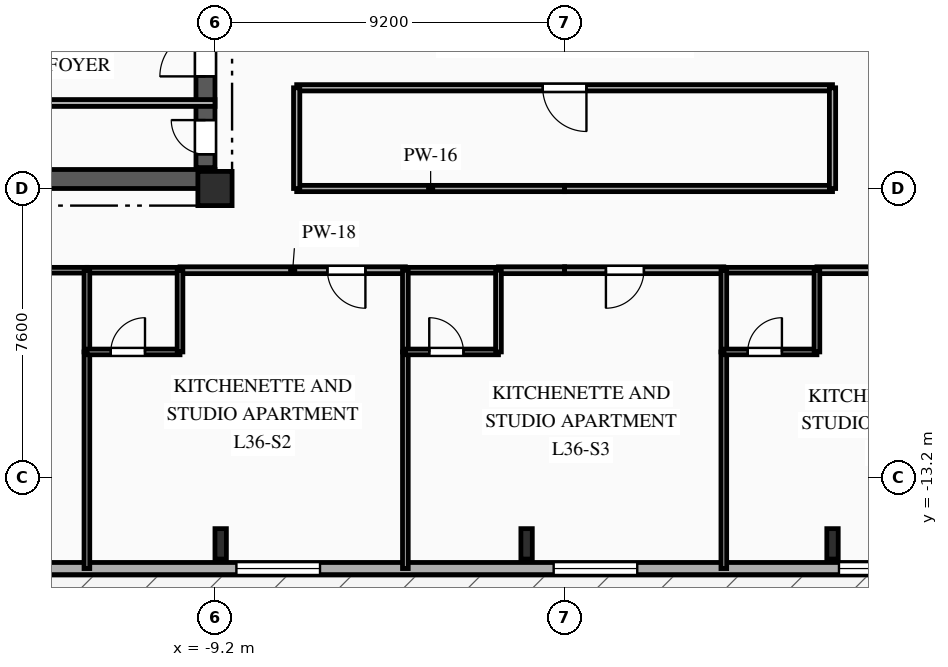
"""IFC4 building model, lengths in metres.
Left out: names, types, materials, properties, quantities, classifications, styles, units other than length and angle.
Written with IfcOpenShell. Run it as: python <this file> out.ifc"""

import sys

from ifc_helpers import new_model, si_unit, direction, frame, frame_2d, origin, origin_2d, place, context, subcontext, project, spatial, rectangle, i_section, extrude, element, fill, save


model = new_model("IFC4")
c1 = context("Model", 3, precision=1e-05, world=origin(), true_north=direction((0.0, 1.0)))
c2 = subcontext(c1, "Body", "Model", "MODEL_VIEW")
j1 = project(units=[si_unit("LENGTHUNIT", "METRE"), si_unit("PLANEANGLEUNIT", "RADIAN")], contexts=[c1])
p1 = place(None, origin())
s1 = spatial("IfcSite", under=j1, at=p1, CompositionType="ELEMENT")
p2 = place(p1, origin())
s2 = spatial("IfcBuilding", under=s1, at=p2, CompositionType="ELEMENT")
p3 = place(p2, frame((0.0, 0.0, 131.0)))
s3 = spatial("IfcBuildingStorey", under=s2, at=p3, CompositionType="ELEMENT", Elevation=131.0)
p4 = place(p3, frame((-9.2, -5.6, 0.0), z_axis=(0.0, 0.0, 1.0), x_axis=(1.0, 0.0, 0.0)))
e1 = element("IfcColumn", 1, at=p4, inside=s3, PredefinedType="COLUMN", context=c2, shape_type="SweptSolid", body=[
    extrude(rectangle(XDim=0.9, YDim=0.9, at=origin_2d()), origin(), (0.0, 0.0, 1.0), 3.35),
])
for number, where, z_axis, x_axis in (
    (2, (-9.05, -14.95, 0.0), (0.0, 0.0, 1.0), (1.0, 0.0, 0.0)),
    (3, (-1.0, -14.95, 0.0), (0.0, 0.0, 1.0), (1.0, 0.0, 0.0)),
    (4, (7.05, -14.95, 0.0), (0.0, 0.0, 1.0), (1.0, 0.0, 0.0)),
):
    element("IfcColumn", number, at=place(p3, frame(where, z_axis=z_axis, x_axis=x_axis)), inside=s3, PredefinedType="COLUMN", context=c2, shape_type="SweptSolid", body=[
        extrude(i_section(OverallWidth=0.3, OverallDepth=0.8, WebThickness=0.018, FlangeThickness=0.033, FilletRadius=0.03, at=origin_2d()), origin(), (0.0, 0.0, 1.0), 3.35),
    ])
p5 = place(p3, frame((23.8, -15.6, 0.0), z_axis=(0.0, 0.0, 1.0), x_axis=(-1.0, 0.0, 0.0)))
e5 = element("IfcWall", 5, at=p5, inside=s3, PredefinedType="SOLIDWALL", context=c2, shape_type="SweptSolid", body=[
    extrude(rectangle(XDim=49.6, YDim=0.32, at=frame_2d((24.8, 0.0))), origin(), (0.0, 0.0, 1.0), 3.04),
])
p6 = place(p5, frame((1.13, 0.0, 0.85)))
e6 = element("IfcOpeningElement", 6, at=p6, cuts=e5, PredefinedType="OPENING", context=c2, shape_type="SweptSolid", body=[
    extrude(rectangle(XDim=1.1, YDim=1.85, at=frame_2d((0.55, 0.925))), frame((0.0, 0.17, 0.0), z_axis=(0.0, -1.0, 0.0), x_axis=(1.0, 0.0, 0.0)), (0.0, 0.0, 1.0), 0.34),
])
p7 = place(p5, frame((6.255, 0.0, 0.85)))
e7 = element("IfcOpeningElement", 7, at=p7, cuts=e5, PredefinedType="OPENING", context=c2, shape_type="SweptSolid", body=[
    extrude(rectangle(XDim=1.65, YDim=1.85, at=frame_2d((0.825, 0.925))), frame((0.0, 0.17, 0.0), z_axis=(0.0, -1.0, 0.0), x_axis=(1.0, 0.0, 0.0)), (0.0, 0.0, 1.0), 0.34),
])
p8 = place(p5, frame((14.38, 0.0, 0.85)))
e8 = element("IfcOpeningElement", 8, at=p8, cuts=e5, PredefinedType="OPENING", context=c2, shape_type="SweptSolid", body=[
    extrude(rectangle(XDim=2.2, YDim=1.85, at=frame_2d((1.1, 0.925))), frame((0.0, 0.17, 0.0), z_axis=(0.0, -1.0, 0.0), x_axis=(1.0, 0.0, 0.0)), (0.0, 0.0, 1.0), 0.34),
])
p9 = place(p5, frame((21.888, 0.0, 0.85)))
e9 = element("IfcOpeningElement", 9, at=p9, cuts=e5, PredefinedType="OPENING", context=c2, shape_type="SweptSolid", body=[
    extrude(rectangle(XDim=2.2, YDim=1.85, at=frame_2d((1.1, 0.925))), frame((0.0, 0.17, 0.0), z_axis=(0.0, -1.0, 0.0), x_axis=(1.0, 0.0, 0.0)), (0.0, 0.0, 1.0), 0.34),
])
p10 = place(p5, frame((30.236, 0.0, 0.85)))
e10 = element("IfcOpeningElement", 10, at=p10, cuts=e5, PredefinedType="OPENING", context=c2, shape_type="SweptSolid", body=[
    extrude(rectangle(XDim=2.2, YDim=1.85, at=frame_2d((1.1, 0.925))), frame((0.0, 0.17, 0.0), z_axis=(0.0, -1.0, 0.0), x_axis=(1.0, 0.0, 0.0)), (0.0, 0.0, 1.0), 0.34),
])
p11 = place(p5, frame((38.897, 0.0, 0.85)))
e11 = element("IfcOpeningElement", 11, at=p11, cuts=e5, PredefinedType="OPENING", context=c2, shape_type="SweptSolid", body=[
    extrude(rectangle(XDim=1.65, YDim=1.85, at=frame_2d((0.825, 0.925))), frame((0.0, 0.17, 0.0), z_axis=(0.0, -1.0, 0.0), x_axis=(1.0, 0.0, 0.0)), (0.0, 0.0, 1.0), 0.34),
])
p12 = place(p5, frame((46.175, 0.0, 0.85)))
e12 = element("IfcOpeningElement", 12, at=p12, cuts=e5, PredefinedType="OPENING", context=c2, shape_type="SweptSolid", body=[
    extrude(rectangle(XDim=1.65, YDim=1.85, at=frame_2d((0.825, 0.925))), frame((0.0, 0.17, 0.0), z_axis=(0.0, -1.0, 0.0), x_axis=(1.0, 0.0, 0.0)), (0.0, 0.0, 1.0), 0.34),
])
p13 = place(p3, frame((-23.376, -19.829, 0.0), z_axis=(0.0, 0.0, 1.0), x_axis=(0.994522202864, 0.104525537599, 0.0)))
e13 = element("IfcWall", 13, at=p13, inside=s3, PredefinedType="PARAPET", context=c2, shape_type="SweptSolid", body=[
    extrude(rectangle(XDim=38.546, YDim=0.22, at=frame_2d((19.273, 0.0))), origin(), (0.0, 0.0, 1.0), 0.65),
])
p14 = place(p3, frame((-18.8, -5.35, 0.0), z_axis=(0.0, 0.0, 1.0), x_axis=(1.0, 0.0, 0.0)))
e14 = element("IfcWall", 14, at=p14, inside=s3, PredefinedType="SHEAR", context=c2, shape_type="SweptSolid", body=[
    extrude(rectangle(XDim=9.6, YDim=0.5, at=frame_2d((4.8, 0.0))), origin(), (0.0, 0.0, 1.0), 3.04),
])
p15 = place(p14, frame((1.05, 0.0, 0.0)))
e15 = element("IfcOpeningElement", 15, at=p15, cuts=e14, PredefinedType="OPENING", context=c2, shape_type="SweptSolid", body=[
    extrude(rectangle(XDim=0.9, YDim=2.1, at=frame_2d((0.45, 1.05))), frame((0.0, 0.26, 0.0), z_axis=(0.0, -1.0, 0.0), x_axis=(1.0, 0.0, 0.0)), (0.0, 0.0, 1.0), 0.52),
])
p16 = place(p3, frame((-9.45, -5.05, 0.0), z_axis=(0.0, 0.0, 1.0), x_axis=(0.0, 1.0, 0.0)))
e16 = element("IfcWall", 16, at=p16, inside=s3, PredefinedType="SHEAR", context=c2, shape_type="SweptSolid", body=[
    extrude(rectangle(XDim=10.1, YDim=0.5, at=frame_2d((5.05, 0.0))), origin(), (0.0, 0.0, 1.0), 3.04),
])
p17 = place(p16, frame((7.15, 0.0, 0.0)))
e17 = element("IfcOpeningElement", 17, at=p17, cuts=e16, PredefinedType="OPENING", context=c2, shape_type="SweptSolid", body=[
    extrude(rectangle(XDim=0.9, YDim=2.1, at=frame_2d((0.45, 1.05))), frame((0.0, 0.26, 0.0), z_axis=(0.0, -1.0, 0.0), x_axis=(1.0, 0.0, 0.0)), (0.0, 0.0, 1.0), 0.52),
])
p18 = place(p16, frame((2.4, 0.0, 0.0)))
e18 = element("IfcOpeningElement", 18, at=p18, cuts=e16, PredefinedType="OPENING", context=c2, shape_type="SweptSolid", body=[
    extrude(rectangle(XDim=1.2, YDim=2.15, at=frame_2d((0.6, 1.075))), frame((0.0, 0.26, 0.0), z_axis=(0.0, -1.0, 0.0), x_axis=(1.0, 0.0, 0.0)), (0.0, 0.0, 1.0), 0.52),
])
p19 = place(p16, frame((0.35, 0.0, 0.0)))
e19 = element("IfcOpeningElement", 19, at=p19, cuts=e16, PredefinedType="OPENING", context=c2, shape_type="SweptSolid", body=[
    extrude(rectangle(XDim=0.9, YDim=2.1, at=frame_2d((0.45, 1.05))), frame((0.0, 0.26, 0.0), z_axis=(0.0, -1.0, 0.0), x_axis=(1.0, 0.0, 0.0)), (0.0, 0.0, 1.0), 0.52),
])
p20 = place(p16, frame((5.0, 0.0, 0.0)))
e20 = element("IfcOpeningElement", 20, at=p20, cuts=e16, PredefinedType="OPENING", context=c2, shape_type="SweptSolid", body=[
    extrude(rectangle(XDim=0.9, YDim=2.1, at=frame_2d((0.45, 1.05))), frame((0.0, 0.26, 0.0), z_axis=(0.0, -1.0, 0.0), x_axis=(1.0, 0.0, 0.0)), (0.0, 0.0, 1.0), 0.52),
])
p21 = place(p3, frame((-15.05, -3.35, 0.0), z_axis=(0.0, 0.0, 1.0), x_axis=(1.0, 0.0, 0.0)))
e21 = element("IfcWall", 21, at=p21, inside=s3, PredefinedType="PARTITIONING", context=c2, shape_type="SweptSolid", body=[
    extrude(rectangle(XDim=5.85, YDim=0.18, at=frame_2d((2.925, 0.0))), origin(), (0.0, 0.0, 1.0), 2.755),
])
p22 = place(p3, frame((-12.57, -7.75, 0.0), z_axis=(0.0, 0.0, 1.0), x_axis=(-1.0, 0.0, 0.0)))
e22 = element("IfcWall", 22, at=p22, inside=s3, PredefinedType="PARTITIONING", context=c2, shape_type="SweptSolid", body=[
    extrude(rectangle(XDim=8.38, YDim=0.15, at=frame_2d((4.19, 0.0))), origin(), (0.0, 0.0, 1.0), 3.04),
])
p23 = place(p22, frame((1.351, 0.0, 0.0)))
e23 = element("IfcOpeningElement", 23, at=p23, cuts=e22, PredefinedType="OPENING", context=c2, shape_type="SweptSolid", body=[
    extrude(rectangle(XDim=1.05, YDim=2.15, at=frame_2d((0.525, 1.075))), frame((0.0, 0.085, 0.0), z_axis=(0.0, -1.0, 0.0), x_axis=(1.0, 0.0, 0.0)), (0.0, 0.0, 1.0), 0.17),
])
p24 = place(p3, frame((-4.19, -7.75, 0.0), z_axis=(0.0, 0.0, 1.0), x_axis=(-1.0, 0.0, 0.0)))
e24 = element("IfcWall", 24, at=p24, inside=s3, PredefinedType="PARTITIONING", context=c2, shape_type="SweptSolid", body=[
    extrude(rectangle(XDim=5.93, YDim=0.18, at=frame_2d((2.965, 0.0))), origin(), (0.0, 0.0, 1.0), 3.04),
])
p25 = place(p24, frame((1.051, 0.0, 0.0)))
e25 = element("IfcOpeningElement", 25, at=p25, cuts=e24, PredefinedType="OPENING", context=c2, shape_type="SweptSolid", body=[
    extrude(rectangle(XDim=1.0, YDim=2.15, at=frame_2d((0.5, 1.075))), frame((0.0, 0.1, 0.0), z_axis=(0.0, -1.0, 0.0), x_axis=(1.0, 0.0, 0.0)), (0.0, 0.0, 1.0), 0.2),
])
p26 = place(p3, frame((-10.12, -7.75, 0.0), z_axis=(0.0, 0.0, 1.0), x_axis=(-1.0, 0.0, 0.0)))
e26 = element("IfcWall", 26, at=p26, inside=s3, PredefinedType="PLUMBINGWALL", context=c2, shape_type="SweptSolid", body=[
    extrude(rectangle(XDim=2.45, YDim=0.15, at=frame_2d((1.225, 0.0))), origin(), (0.0, 0.0, 1.0), 3.04),
])
p27 = place(p3, frame((0.0, -7.75, 0.0), z_axis=(0.0, 0.0, 1.0), x_axis=(-1.0, 0.0, 0.0)))
e27 = element("IfcWall", 27, at=p27, inside=s3, PredefinedType="PARTITIONING", context=c2, shape_type="SweptSolid", body=[
    extrude(rectangle(XDim=1.74, YDim=0.18, at=frame_2d((0.87, 0.0))), origin(), (0.0, 0.0, 1.0), 3.04),
])
p28 = place(p3, frame((-1.74, -7.75, 0.0), z_axis=(0.0, 0.0, 1.0), x_axis=(-1.0, 0.0, 0.0)))
e28 = element("IfcWall", 28, at=p28, inside=s3, PredefinedType="PLUMBINGWALL", context=c2, shape_type="SweptSolid", body=[
    extrude(rectangle(XDim=2.45, YDim=0.15, at=frame_2d((1.225, 0.0))), origin(), (0.0, 0.0, 1.0), 3.04),
])
p29 = place(p3, frame((-7.05, -5.6, 0.0), z_axis=(0.0, 0.0, 1.0), x_axis=(1.0, 0.0, 0.0)))
e29 = element("IfcWall", 29, at=p29, inside=s3, PredefinedType="PARTITIONING", context=c2, shape_type="SweptSolid", body=[
    extrude(rectangle(XDim=7.05, YDim=0.165, at=frame_2d((3.525, 0.0))), origin(), (0.0, 0.0, 1.0), 2.525),
])
p30 = place(p3, frame((4.19, -7.75, 0.0), z_axis=(0.0, 0.0, 1.0), x_axis=(-1.0, 0.0, 0.0)))
e30 = element("IfcWall", 30, at=p30, inside=s3, PredefinedType="PARTITIONING", context=c2, shape_type="SweptSolid", body=[
    extrude(rectangle(XDim=4.19, YDim=0.18, at=frame_2d((2.095, 0.0))), origin(), (0.0, 0.0, 1.0), 3.04),
])
p31 = place(p30, frame((2.103, 0.0, 0.0)))
e31 = element("IfcOpeningElement", 31, at=p31, cuts=e30, PredefinedType="OPENING", context=c2, shape_type="SweptSolid", body=[
    extrude(rectangle(XDim=1.0, YDim=2.15, at=frame_2d((0.5, 1.075))), frame((0.0, 0.1, 0.0), z_axis=(0.0, -1.0, 0.0), x_axis=(1.0, 0.0, 0.0)), (0.0, 0.0, 1.0), 0.2),
])
p32 = place(p3, frame((12.57, -7.75, 0.0), z_axis=(0.0, 0.0, 1.0), x_axis=(-1.0, 0.0, 0.0)))
e32 = element("IfcWall", 32, at=p32, inside=s3, PredefinedType="PARTITIONING", context=c2, shape_type="SweptSolid", body=[
    extrude(rectangle(XDim=5.93, YDim=0.18, at=frame_2d((2.965, 0.0))), origin(), (0.0, 0.0, 1.0), 3.04),
])
p33 = place(p32, frame((1.051, 0.0, 0.0)))
e33 = element("IfcOpeningElement", 33, at=p33, cuts=e32, PredefinedType="OPENING", context=c2, shape_type="SweptSolid", body=[
    extrude(rectangle(XDim=1.0, YDim=2.15, at=frame_2d((0.5, 1.075))), frame((0.0, 0.1, 0.0), z_axis=(0.0, -1.0, 0.0), x_axis=(1.0, 0.0, 0.0)), (0.0, 0.0, 1.0), 0.2),
])
p34 = place(p3, frame((6.64, -7.75, 0.0), z_axis=(0.0, 0.0, 1.0), x_axis=(-1.0, 0.0, 0.0)))
e34 = element("IfcWall", 34, at=p34, inside=s3, PredefinedType="PLUMBINGWALL", context=c2, shape_type="SweptSolid", body=[
    extrude(rectangle(XDim=2.45, YDim=0.15, at=frame_2d((1.225, 0.0))), origin(), (0.0, 0.0, 1.0), 3.04),
])
p35 = place(p3, frame((0.0, -5.6, 0.0), z_axis=(0.0, 0.0, 1.0), x_axis=(1.0, 0.0, 0.0)))
e35 = element("IfcWall", 35, at=p35, inside=s3, PredefinedType="PARTITIONING", context=c2, shape_type="SweptSolid", body=[
    extrude(rectangle(XDim=7.05, YDim=0.165, at=frame_2d((3.525, 0.0))), origin(), (0.0, 0.0, 1.0), 2.525),
])
p36 = place(p3, frame((7.05, -2.95, 0.0), z_axis=(0.0, 0.0, 1.0), x_axis=(-1.0, 0.0, 0.0)))
e36 = element("IfcWall", 36, at=p36, inside=s3, PredefinedType="PARTITIONING", context=c2, shape_type="SweptSolid", body=[
    extrude(rectangle(XDim=14.1, YDim=0.165, at=frame_2d((7.05, 0.0))), origin(), (0.0, 0.0, 1.0), 3.04),
])
p37 = place(p36, frame((6.475, 0.0, 0.0)))
e37 = element("IfcOpeningElement", 37, at=p37, cuts=e36, PredefinedType="OPENING", context=c2, shape_type="SweptSolid", body=[
    extrude(rectangle(XDim=1.15, YDim=2.15, at=frame_2d((0.575, 1.075))), frame((0.0, 0.093, 0.0), z_axis=(0.0, -1.0, 0.0), x_axis=(1.0, 0.0, 0.0)), (0.0, 0.0, 1.0), 0.185),
])
for number, where, z_axis, x_axis in (
    (38, (-7.05, -2.95, 0.0), (0.0, 0.0, 1.0), (0.0, -1.0, 0.0)),
    (39, (7.05, -5.6, 0.0), (0.0, 0.0, 1.0), (0.0, 1.0, 0.0)),
):
    element("IfcWall", number, at=place(p3, frame(where, z_axis=z_axis, x_axis=x_axis)), inside=s3, PredefinedType="PARTITIONING", context=c2, shape_type="SweptSolid", body=[
        extrude(rectangle(XDim=2.65, YDim=0.165, at=frame_2d((1.325, 0.0))), origin(), (0.0, 0.0, 1.0), 3.04),
    ])
p38 = place(p3, frame((-12.57, -9.9, 0.0), z_axis=(0.0, 0.0, 1.0), x_axis=(0.0, -1.0, 0.0)))
e40 = element("IfcWall", 40, at=p38, inside=s3, PredefinedType="PARTITIONING", context=c2, shape_type="SweptSolid", body=[
    extrude(rectangle(XDim=5.7, YDim=0.15, at=frame_2d((2.85, 0.0))), origin(), (0.0, 0.0, 1.0), 3.04),
])
p39 = place(p3, frame((-12.57, -7.75, 0.0), z_axis=(0.0, 0.0, 1.0), x_axis=(0.0, -1.0, 0.0)))
e41 = element("IfcWall", 41, at=p39, inside=s3, PredefinedType="PLUMBINGWALL", context=c2, shape_type="SweptSolid", body=[
    extrude(rectangle(XDim=2.15, YDim=0.15, at=frame_2d((1.075, 0.0))), origin(), (0.0, 0.0, 1.0), 3.04),
])
p40 = place(p3, frame((-12.57, -9.9, 0.0), z_axis=(0.0, 0.0, 1.0), x_axis=(1.0, 0.0, 0.0)))
e42 = element("IfcWall", 42, at=p40, inside=s3, PredefinedType="PLUMBINGWALL", context=c2, shape_type="SweptSolid", body=[
    extrude(rectangle(XDim=2.45, YDim=0.15, at=frame_2d((1.225, 0.0))), origin(), (0.0, 0.0, 1.0), 3.04),
])
p41 = place(p40, frame((0.629, 0.0, 0.0)))
e43 = element("IfcOpeningElement", 43, at=p41, cuts=e42, PredefinedType="OPENING", context=c2, shape_type="SweptSolid", body=[
    extrude(rectangle(XDim=0.9, YDim=2.1, at=frame_2d((0.45, 1.05))), frame((0.0, 0.085, 0.0), z_axis=(0.0, -1.0, 0.0), x_axis=(1.0, 0.0, 0.0)), (0.0, 0.0, 1.0), 0.17),
])
p42 = place(p3, frame((-10.12, -9.9, 0.0), z_axis=(0.0, 0.0, 1.0), x_axis=(0.0, 1.0, 0.0)))
e44 = element("IfcWall", 44, at=p42, inside=s3, PredefinedType="PLUMBINGWALL", context=c2, shape_type="SweptSolid", body=[
    extrude(rectangle(XDim=2.15, YDim=0.15, at=frame_2d((1.075, 0.0))), origin(), (0.0, 0.0, 1.0), 3.04),
])
p43 = place(p3, frame((-4.19, -9.9, 0.0), z_axis=(0.0, 0.0, 1.0), x_axis=(0.0, -1.0, 0.0)))
e45 = element("IfcWall", 45, at=p43, inside=s3, PredefinedType="PARTITIONING", context=c2, shape_type="SweptSolid", body=[
    extrude(rectangle(XDim=5.7, YDim=0.15, at=frame_2d((2.85, 0.0))), origin(), (0.0, 0.0, 1.0), 3.04),
])
p44 = place(p3, frame((-4.19, -7.75, 0.0), z_axis=(0.0, 0.0, 1.0), x_axis=(0.0, -1.0, 0.0)))
e46 = element("IfcWall", 46, at=p44, inside=s3, PredefinedType="PLUMBINGWALL", context=c2, shape_type="SweptSolid", body=[
    extrude(rectangle(XDim=2.15, YDim=0.15, at=frame_2d((1.075, 0.0))), origin(), (0.0, 0.0, 1.0), 3.04),
])
p45 = place(p3, frame((-4.19, -9.9, 0.0), z_axis=(0.0, 0.0, 1.0), x_axis=(1.0, 0.0, 0.0)))
e47 = element("IfcWall", 47, at=p45, inside=s3, PredefinedType="PLUMBINGWALL", context=c2, shape_type="SweptSolid", body=[
    extrude(rectangle(XDim=2.45, YDim=0.15, at=frame_2d((1.225, 0.0))), origin(), (0.0, 0.0, 1.0), 3.04),
])
p46 = place(p45, frame((0.629, 0.0, 0.0)))
e48 = element("IfcOpeningElement", 48, at=p46, cuts=e47, PredefinedType="OPENING", context=c2, shape_type="SweptSolid", body=[
    extrude(rectangle(XDim=0.9, YDim=2.1, at=frame_2d((0.45, 1.05))), frame((0.0, 0.085, 0.0), z_axis=(0.0, -1.0, 0.0), x_axis=(1.0, 0.0, 0.0)), (0.0, 0.0, 1.0), 0.17),
])
p47 = place(p3, frame((-1.74, -9.9, 0.0), z_axis=(0.0, 0.0, 1.0), x_axis=(0.0, 1.0, 0.0)))
e49 = element("IfcWall", 49, at=p47, inside=s3, PredefinedType="PLUMBINGWALL", context=c2, shape_type="SweptSolid", body=[
    extrude(rectangle(XDim=2.15, YDim=0.15, at=frame_2d((1.075, 0.0))), origin(), (0.0, 0.0, 1.0), 3.04),
])
p48 = place(p3, frame((4.19, -9.9, 0.0), z_axis=(0.0, 0.0, 1.0), x_axis=(0.0, -1.0, 0.0)))
e50 = element("IfcWall", 50, at=p48, inside=s3, PredefinedType="PARTITIONING", context=c2, shape_type="SweptSolid", body=[
    extrude(rectangle(XDim=5.7, YDim=0.15, at=frame_2d((2.85, 0.0))), origin(), (0.0, 0.0, 1.0), 3.04),
])
p49 = place(p3, frame((4.19, -7.75, 0.0), z_axis=(0.0, 0.0, 1.0), x_axis=(0.0, -1.0, 0.0)))
e51 = element("IfcWall", 51, at=p49, inside=s3, PredefinedType="PLUMBINGWALL", context=c2, shape_type="SweptSolid", body=[
    extrude(rectangle(XDim=2.15, YDim=0.15, at=frame_2d((1.075, 0.0))), origin(), (0.0, 0.0, 1.0), 3.04),
])
p50 = place(p3, frame((4.19, -9.9, 0.0), z_axis=(0.0, 0.0, 1.0), x_axis=(1.0, 0.0, 0.0)))
e52 = element("IfcWall", 52, at=p50, inside=s3, PredefinedType="PLUMBINGWALL", context=c2, shape_type="SweptSolid", body=[
    extrude(rectangle(XDim=2.45, YDim=0.15, at=frame_2d((1.225, 0.0))), origin(), (0.0, 0.0, 1.0), 3.04),
])
p51 = place(p50, frame((0.629, 0.0, 0.0)))
e53 = element("IfcOpeningElement", 53, at=p51, cuts=e52, PredefinedType="OPENING", context=c2, shape_type="SweptSolid", body=[
    extrude(rectangle(XDim=0.9, YDim=2.1, at=frame_2d((0.45, 1.05))), frame((0.0, 0.085, 0.0), z_axis=(0.0, -1.0, 0.0), x_axis=(1.0, 0.0, 0.0)), (0.0, 0.0, 1.0), 0.17),
])
p52 = place(p3, frame((6.64, -9.9, 0.0), z_axis=(0.0, 0.0, 1.0), x_axis=(0.0, 1.0, 0.0)))
e54 = element("IfcWall", 54, at=p52, inside=s3, PredefinedType="PLUMBINGWALL", context=c2, shape_type="SweptSolid", body=[
    extrude(rectangle(XDim=2.15, YDim=0.15, at=frame_2d((1.075, 0.0))), origin(), (0.0, 0.0, 1.0), 3.04),
])
p53 = place(p8, origin())
e55 = element("IfcWindow", 55, at=p53, inside=s3, PartitioningType="SINGLE_PANEL", PredefinedType="WINDOW", context=c2, shape_type="SweptSolid", body=[
    extrude(rectangle(XDim=2.2, YDim=1.85, at=frame_2d((1.1, 0.925))), frame((0.0, 0.03, 0.0), z_axis=(0.0, -1.0, 0.0), x_axis=(1.0, 0.0, 0.0)), (0.0, 0.0, 1.0), 0.06),
])
fill(e8, e55)
p54 = place(p9, origin())
e56 = element("IfcWindow", 56, at=p54, inside=s3, PartitioningType="SINGLE_PANEL", PredefinedType="WINDOW", context=c2, shape_type="SweptSolid", body=[
    extrude(rectangle(XDim=2.2, YDim=1.85, at=frame_2d((1.1, 0.925))), frame((0.0, 0.03, 0.0), z_axis=(0.0, -1.0, 0.0), x_axis=(1.0, 0.0, 0.0)), (0.0, 0.0, 1.0), 0.06),
])
fill(e9, e56)
p55 = place(p10, origin())
e57 = element("IfcWindow", 57, at=p55, inside=s3, PartitioningType="SINGLE_PANEL", PredefinedType="WINDOW", context=c2, shape_type="SweptSolid", body=[
    extrude(rectangle(XDim=2.2, YDim=1.85, at=frame_2d((1.1, 0.925))), frame((0.0, 0.03, 0.0), z_axis=(0.0, -1.0, 0.0), x_axis=(1.0, 0.0, 0.0)), (0.0, 0.0, 1.0), 0.06),
])
fill(e10, e57)
p56 = place(p18, origin())
e58 = element("IfcDoor", 58, at=p56, inside=s3, OperationType="SINGLE_SWING_LEFT", PredefinedType="DOOR", context=c2, shape_type="SweptSolid", body=[
    extrude(rectangle(XDim=1.2, YDim=2.15, at=frame_2d((0.6, 1.075))), frame((0.0, 0.025, 0.0), z_axis=(0.0, -1.0, 0.0), x_axis=(1.0, 0.0, 0.0)), (0.0, 0.0, 1.0), 0.05),
])
fill(e18, e58)
p57 = place(p19, origin())
e59 = element("IfcDoor", 59, at=p57, inside=s3, OperationType="SINGLE_SWING_RIGHT", PredefinedType="DOOR", context=c2, shape_type="SweptSolid", body=[
    extrude(rectangle(XDim=0.9, YDim=2.1, at=frame_2d((0.45, 1.05))), frame((0.0, 0.025, 0.0), z_axis=(0.0, -1.0, 0.0), x_axis=(1.0, 0.0, 0.0)), (0.0, 0.0, 1.0), 0.05),
])
fill(e19, e59)
p58 = place(p25, origin())
e60 = element("IfcDoor", 60, at=p58, inside=s3, OperationType="SINGLE_SWING_LEFT", PredefinedType="DOOR", context=c2, shape_type="SweptSolid", body=[
    extrude(rectangle(XDim=1.0, YDim=2.15, at=frame_2d((0.5, 1.075))), frame((0.0, 0.025, 0.0), z_axis=(0.0, -1.0, 0.0), x_axis=(1.0, 0.0, 0.0)), (0.0, 0.0, 1.0), 0.05),
])
fill(e25, e60)
p59 = place(p31, origin())
e61 = element("IfcDoor", 61, at=p59, inside=s3, OperationType="SINGLE_SWING_RIGHT", PredefinedType="DOOR", context=c2, shape_type="SweptSolid", body=[
    extrude(rectangle(XDim=1.0, YDim=2.15, at=frame_2d((0.5, 1.075))), frame((0.0, 0.025, 0.0), z_axis=(0.0, -1.0, 0.0), x_axis=(1.0, 0.0, 0.0)), (0.0, 0.0, 1.0), 0.05),
])
fill(e31, e61)
p60 = place(p37, origin())
e62 = element("IfcDoor", 62, at=p60, inside=s3, OperationType="SINGLE_SWING_LEFT", PredefinedType="DOOR", context=c2, shape_type="SweptSolid", body=[
    extrude(rectangle(XDim=1.15, YDim=2.15, at=frame_2d((0.575, 1.075))), frame((0.0, 0.025, 0.0), z_axis=(0.0, -1.0, 0.0), x_axis=(1.0, 0.0, 0.0)), (0.0, 0.0, 1.0), 0.05),
])
fill(e37, e62)
p61 = place(p41, origin())
e63 = element("IfcDoor", 63, at=p61, inside=s3, OperationType="SINGLE_SWING_RIGHT", PredefinedType="DOOR", context=c2, shape_type="SweptSolid", body=[
    extrude(rectangle(XDim=0.9, YDim=2.1, at=frame_2d((0.45, 1.05))), frame((0.0, 0.025, 0.0), z_axis=(0.0, -1.0, 0.0), x_axis=(1.0, 0.0, 0.0)), (0.0, 0.0, 1.0), 0.05),
])
fill(e43, e63)
p62 = place(p46, origin())
e64 = element("IfcDoor", 64, at=p62, inside=s3, OperationType="SINGLE_SWING_LEFT", PredefinedType="DOOR", context=c2, shape_type="SweptSolid", body=[
    extrude(rectangle(XDim=0.9, YDim=2.1, at=frame_2d((0.45, 1.05))), frame((0.0, 0.025, 0.0), z_axis=(0.0, -1.0, 0.0), x_axis=(1.0, 0.0, 0.0)), (0.0, 0.0, 1.0), 0.05),
])
fill(e48, e64)
p63 = place(p51, origin())
e65 = element("IfcDoor", 65, at=p63, inside=s3, OperationType="SINGLE_SWING_RIGHT", PredefinedType="DOOR", context=c2, shape_type="SweptSolid", body=[
    extrude(rectangle(XDim=0.9, YDim=2.1, at=frame_2d((0.45, 1.05))), frame((0.0, 0.025, 0.0), z_axis=(0.0, -1.0, 0.0), x_axis=(1.0, 0.0, 0.0)), (0.0, 0.0, 1.0), 0.05),
])
fill(e53, e65)
save(model, sys.argv[1])
